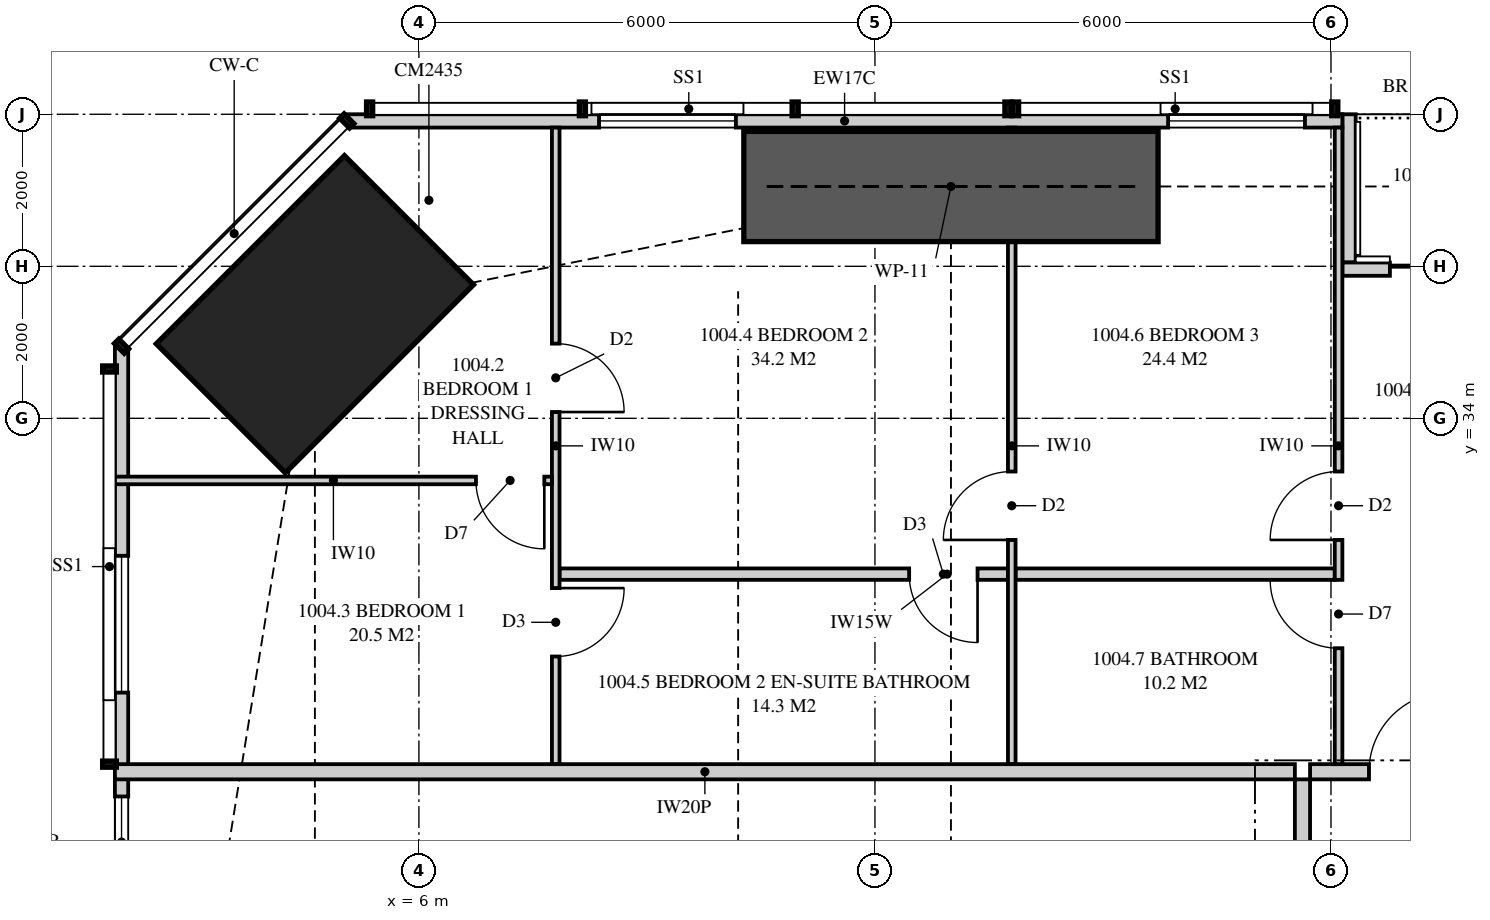
"""IFC4 building model, lengths in metres.
Left out: names, types, materials, properties, quantities, classifications, styles, units other than length and angle.
Written with IfcOpenShell. Run it as: python <this file> out.ifc"""

import sys

from ifc_helpers import new_model, si_unit, direction, frame, frame_2d, origin, origin_2d, place, context, subcontext, project, spatial, polyline, rectangle, outline, extrude, element, fill, save


model = new_model("IFC4")
c1 = context("Model", 3, precision=1e-05, world=origin(), true_north=direction((0.0, 1.0)))
c2 = subcontext(c1, "Body", "Model", "MODEL_VIEW")
j1 = project(units=[si_unit("LENGTHUNIT", "METRE"), si_unit("PLANEANGLEUNIT", "RADIAN")], contexts=[c1])
p1 = place(None, origin())
s1 = spatial("IfcSite", under=j1, at=p1, CompositionType="ELEMENT")
p2 = place(p1, origin())
s2 = spatial("IfcBuilding", under=s1, at=p2, CompositionType="ELEMENT")
p3 = place(p2, frame((0.0, 0.0, 41.1)))
s3 = spatial("IfcBuildingStorey", under=s2, at=p3, CompositionType="ELEMENT", Elevation=41.1)
p4 = place(p3, frame((4.631, 35.369, 0.0), z_axis=(0.0, 0.0, 1.0), x_axis=(0.707106781187, -0.707106781187, 0.0)))
e1 = element("IfcColumn", 1, at=p4, inside=s3, PredefinedType="COLUMN", context=c2, shape_type="SweptSolid", body=[
    extrude(rectangle(XDim=2.4, YDim=3.5, at=origin_2d()), origin(), (0.0, 0.0, 1.0), 3.35),
])
p5 = place(p3, frame((18.15, 37.913, 0.0), z_axis=(0.0, 0.0, 1.0), x_axis=(-1.0, 0.0, 0.0)))
e2 = element("IfcWall", 2, at=p5, inside=s3, PredefinedType="SOLIDWALL", context=c2, shape_type="SweptSolid", body=[
    extrude(outline(polyline([(0.0, 0.0), (13.099, 0.0), (13.099, 3.11), (5.354, 3.11), (5.354, 2.15), (5.306, 2.15), (5.306, 3.11), (5.15, 3.11), (5.15, 2.15), (0.0, 2.15), (0.0, 0.0)])), frame((0.0, 0.087, 0.0), z_axis=(0.0, -1.0, 0.0), x_axis=(1.0, 0.0, 0.0)), (0.0, 0.0, 1.0), 0.175),
])
p6 = place(p5, frame((0.492, 0.0, 0.4)))
e3 = element("IfcOpeningElement", 3, at=p6, cuts=e2, PredefinedType="OPENING", context=c2, shape_type="SweptSolid", body=[
    extrude(rectangle(XDim=1.8, YDim=1.7, at=frame_2d((0.9, 0.85))), frame((0.0, 0.097, 0.0), z_axis=(0.0, -1.0, 0.0), x_axis=(1.0, 0.0, 0.0)), (0.0, 0.0, 1.0), 0.195),
])
p7 = place(p5, frame((7.98, 0.0, 0.4)))
e4 = element("IfcOpeningElement", 4, at=p7, cuts=e2, PredefinedType="OPENING", context=c2, shape_type="SweptSolid", body=[
    extrude(rectangle(XDim=1.8, YDim=1.7, at=frame_2d((0.9, 0.85))), frame((0.0, 0.097, 0.0), z_axis=(0.0, -1.0, 0.0), x_axis=(1.0, 0.0, 0.0)), (0.0, 0.0, 1.0), 0.195),
])
p8 = place(p3, frame((21.2, 35.962, 0.0), z_axis=(0.0, 0.0, 1.0), x_axis=(-1.0, 0.0, 0.0)))
e5 = element("IfcWall", 5, at=p8, inside=s3, PredefinedType="SOLIDWALL", context=c2, shape_type="SweptSolid", body=[
    extrude(rectangle(XDim=3.05, YDim=0.175, at=frame_2d((1.525, 0.0))), origin(), (0.0, 0.0, 1.0), 3.11),
])
p9 = place(p8, frame((0.625, 0.0, 0.0)))
e6 = element("IfcOpeningElement", 6, at=p9, cuts=e5, PredefinedType="OPENING", context=c2, shape_type="SweptSolid", body=[
    extrude(rectangle(XDim=1.8, YDim=2.1, at=frame_2d((0.9, 1.05))), frame((0.0, 0.097, 0.0), z_axis=(0.0, -1.0, 0.0), x_axis=(1.0, 0.0, 0.0)), (0.0, 0.0, 1.0), 0.195),
])
p10 = place(p3, frame((18.238, 38.0, 0.0), z_axis=(0.0, 0.0, 1.0), x_axis=(0.0, -1.0, 0.0)))
e7 = element("IfcWall", 7, at=p10, inside=s3, PredefinedType="SOLIDWALL", context=c2, shape_type="SweptSolid", body=[
    extrude(outline(polyline([(0.0, 0.0), (1.95, 0.0), (1.95, 3.11), (1.75, 3.11), (1.75, 2.15), (0.15, 2.15), (0.15, 3.11), (0.0, 3.11), (0.0, 0.0)])), frame((0.0, 0.087, 0.0), z_axis=(0.0, -1.0, 0.0), x_axis=(1.0, 0.0, 0.0)), (0.0, 0.0, 1.0), 0.175),
])
p11 = place(p3, frame((2.087, 34.949, 0.0), z_axis=(0.0, 0.0, 1.0), x_axis=(0.0, -1.0, 0.0)))
e8 = element("IfcWall", 8, at=p11, inside=s3, PredefinedType="SOLIDWALL", context=c2, shape_type="SweptSolid", body=[
    extrude(outline(polyline([(0.0, 0.0), (16.099, 0.0), (16.099, 2.15), (9.949, 2.15), (9.949, 3.11), (9.823, 3.11), (9.823, 2.15), (9.73, 2.15), (9.73, 3.11), (0.0, 3.11), (0.0, 0.0)])), frame((0.0, 0.087, 0.0), z_axis=(0.0, -1.0, 0.0), x_axis=(1.0, 0.0, 0.0)), (0.0, 0.0, 1.0), 0.175),
])
p12 = place(p11, frame((2.757, 0.0, 0.4)))
e9 = element("IfcOpeningElement", 9, at=p12, cuts=e8, PredefinedType="OPENING", context=c2, shape_type="SweptSolid", body=[
    extrude(rectangle(XDim=1.8, YDim=1.7, at=frame_2d((0.9, 0.85))), frame((0.0, 0.097, 0.0), z_axis=(0.0, -1.0, 0.0), x_axis=(1.0, 0.0, 0.0)), (0.0, 0.0, 1.0), 0.195),
])
p13 = place(p11, frame((5.924, 0.0, 0.4)))
e10 = element("IfcOpeningElement", 10, at=p13, cuts=e8, PredefinedType="OPENING", context=c2, shape_type="SweptSolid", body=[
    extrude(rectangle(XDim=1.2, YDim=1.7, at=frame_2d((0.6, 0.85))), frame((0.0, 0.097, 0.0), z_axis=(0.0, -1.0, 0.0), x_axis=(1.0, 0.0, 0.0)), (0.0, 0.0, 1.0), 0.195),
])
p14 = place(p11, frame((12.799, 0.0, 0.4)))
e11 = element("IfcOpeningElement", 11, at=p14, cuts=e8, PredefinedType="OPENING", context=c2, shape_type="SweptSolid", body=[
    extrude(rectangle(XDim=1.8, YDim=1.7, at=frame_2d((0.9, 0.85))), frame((0.0, 0.097, 0.0), z_axis=(0.0, -1.0, 0.0), x_axis=(1.0, 0.0, 0.0)), (0.0, 0.0, 1.0), 0.195),
])
p15 = place(p3, frame((17.725, 29.35, 0.0), z_axis=(0.0, 0.0, 1.0), x_axis=(1.0, 0.0, 0.0)))
e12 = element("IfcWall", 12, at=p15, inside=s3, PredefinedType="PARTITIONING", context=c2, shape_type="SweptSolid", body=[
    extrude(rectangle(XDim=5.375, YDim=0.2, at=frame_2d((2.688, 0.0))), origin(), (0.0, 0.0, 1.0), 3.11),
])
p16 = place(p15, frame((0.775, 0.0, 0.0)))
e13 = element("IfcOpeningElement", 13, at=p16, cuts=e12, PredefinedType="OPENING", context=c2, shape_type="SweptSolid", body=[
    extrude(rectangle(XDim=1.05, YDim=2.2, at=frame_2d((0.525, 1.1))), frame((0.0, 0.11, 0.0), z_axis=(0.0, -1.0, 0.0), x_axis=(1.0, 0.0, 0.0)), (0.0, 0.0, 1.0), 0.22),
])
p17 = place(p3, frame((7.8, 37.825, 0.0), z_axis=(0.0, 0.0, 1.0), x_axis=(0.0, -1.0, 0.0)))
e14 = element("IfcWall", 14, at=p17, inside=s3, PredefinedType="PARTITIONING", context=c2, shape_type="SweptSolid", body=[
    extrude(outline(polyline([(0.0, 0.0), (8.375, 0.0), (8.375, 3.11), (2.697, 3.11), (2.697, 2.15), (0.943, 2.15), (0.943, 3.11), (0.0, 3.11), (0.0, 0.0)])), frame((0.0, 0.05, 0.0), z_axis=(0.0, -1.0, 0.0), x_axis=(1.0, 0.0, 0.0)), (0.0, 0.0, 1.0), 0.1),
])
p18 = place(p17, frame((2.842, 0.0, 0.0)))
e15 = element("IfcOpeningElement", 15, at=p18, cuts=e14, PredefinedType="OPENING", context=c2, shape_type="SweptSolid", body=[
    extrude(rectangle(XDim=0.9, YDim=2.1, at=frame_2d((0.45, 1.05))), frame((0.0, 0.06, 0.0), z_axis=(0.0, -1.0, 0.0), x_axis=(1.0, 0.0, 0.0)), (0.0, 0.0, 1.0), 0.12),
])
p19 = place(p17, frame((6.059, 0.0, 0.0)))
e16 = element("IfcOpeningElement", 16, at=p19, cuts=e14, PredefinedType="OPENING", context=c2, shape_type="SweptSolid", body=[
    extrude(rectangle(XDim=0.9, YDim=2.1, at=frame_2d((0.45, 1.05))), frame((0.0, 0.06, 0.0), z_axis=(0.0, -1.0, 0.0), x_axis=(1.0, 0.0, 0.0)), (0.0, 0.0, 1.0), 0.12),
])
p20 = place(p3, frame((13.8, 37.825, 0.0), z_axis=(0.0, 0.0, 1.0), x_axis=(0.0, -1.0, 0.0)))
e17 = element("IfcWall", 17, at=p20, inside=s3, PredefinedType="PARTITIONING", context=c2, shape_type="SweptSolid", body=[
    extrude(outline(polyline([(1.635, 2.15), (0.0, 2.15), (0.0, 0.0), (8.375, 0.0), (8.375, 3.11), (1.635, 3.11), (1.635, 2.15)]), holes=[polyline([(1.021, 0.126), (0.529, 0.126), (0.529, 0.919), (1.021, 0.919), (1.021, 0.126)]), polyline([(1.021, 1.231), (0.529, 1.231), (0.529, 2.024), (1.021, 2.024), (1.021, 1.231)])]), frame((0.0, 0.05, 0.0), z_axis=(0.0, -1.0, 0.0), x_axis=(1.0, 0.0, 0.0)), (0.0, 0.0, 1.0), 0.1),
])
p21 = place(p20, frame((4.525, 0.0, 0.0)))
e18 = element("IfcOpeningElement", 18, at=p21, cuts=e17, PredefinedType="OPENING", context=c2, shape_type="SweptSolid", body=[
    extrude(rectangle(XDim=0.9, YDim=2.1, at=frame_2d((0.45, 1.05))), frame((0.0, 0.06, 0.0), z_axis=(0.0, -1.0, 0.0), x_axis=(1.0, 0.0, 0.0)), (0.0, 0.0, 1.0), 0.12),
])
p22 = place(p3, frame((18.1, 37.825, 0.0), z_axis=(0.0, 0.0, 1.0), x_axis=(0.0, -1.0, 0.0)))
e19 = element("IfcWall", 19, at=p22, inside=s3, PredefinedType="PARTITIONING", context=c2, shape_type="SweptSolid", body=[
    extrude(outline(polyline([(0.0, 0.0), (8.375, 0.0), (8.375, 3.11), (1.635, 3.11), (1.635, 2.15), (0.0, 2.15), (0.0, 3.11), (0.0, 0.0)])), frame((0.0, 0.05, 0.0), z_axis=(0.0, -1.0, 0.0), x_axis=(1.0, 0.0, 0.0)), (0.0, 0.0, 1.0), 0.1),
])
p23 = place(p22, frame((4.525, 0.0, 0.0)))
e20 = element("IfcOpeningElement", 20, at=p23, cuts=e19, PredefinedType="OPENING", context=c2, shape_type="SweptSolid", body=[
    extrude(rectangle(XDim=0.9, YDim=2.1, at=frame_2d((0.45, 1.05))), frame((0.0, 0.06, 0.0), z_axis=(0.0, -1.0, 0.0), x_axis=(1.0, 0.0, 0.0)), (0.0, 0.0, 1.0), 0.12),
])
p24 = place(p22, frame((5.95, 0.0, 0.0)))
e21 = element("IfcOpeningElement", 21, at=p24, cuts=e19, PredefinedType="OPENING", context=c2, shape_type="SweptSolid", body=[
    extrude(rectangle(XDim=0.9, YDim=2.1, at=frame_2d((0.45, 1.05))), frame((0.0, 0.06, 0.0), z_axis=(0.0, -1.0, 0.0), x_axis=(1.0, 0.0, 0.0)), (0.0, 0.0, 1.0), 0.12),
])
p25 = place(p3, frame((2.0, 33.183, 0.0), z_axis=(0.0, 0.0, 1.0), x_axis=(1.0, 0.0, 0.0)))
e22 = element("IfcWall", 22, at=p25, inside=s3, PredefinedType="PARTITIONING", context=c2, shape_type="SweptSolid", body=[
    extrude(outline(polyline([(0.0, 0.0), (5.75, 0.0), (5.75, 3.11), (3.148, 3.11), (3.148, 2.15), (1.406, 2.15), (1.406, 3.11), (0.0, 3.11), (0.0, 0.0)])), frame((0.0, 0.05, 0.0), z_axis=(0.0, -1.0, 0.0), x_axis=(1.0, 0.0, 0.0)), (0.0, 0.0, 1.0), 0.1),
])
p26 = place(p25, frame((4.75, 0.0, 0.0)))
e23 = element("IfcOpeningElement", 23, at=p26, cuts=e22, PredefinedType="OPENING", context=c2, shape_type="SweptSolid", body=[
    extrude(rectangle(XDim=0.9, YDim=2.1, at=frame_2d((0.45, 1.05))), frame((0.0, 0.06, 0.0), z_axis=(0.0, -1.0, 0.0), x_axis=(1.0, 0.0, 0.0)), (0.0, 0.0, 1.0), 0.12),
])
p27 = place(p3, frame((7.85, 31.95, 0.0), z_axis=(0.0, 0.0, 1.0), x_axis=(1.0, 0.0, 0.0)))
e24 = element("IfcWall", 24, at=p27, inside=s3, PredefinedType="PLUMBINGWALL", context=c2, shape_type="SweptSolid", body=[
    extrude(outline(polyline([(0.0, 0.0), (5.9, 0.0), (5.9, 3.11), (5.462, 3.11), (5.462, 2.541), (4.838, 2.541), (4.838, 3.11), (3.635, 3.11), (3.635, 2.51), (1.065, 2.51), (1.065, 3.11), (0.0, 3.11), (0.0, 0.0)])), frame((0.0, 0.075, 0.0), z_axis=(0.0, -1.0, 0.0), x_axis=(1.0, 0.0, 0.0)), (0.0, 0.0, 1.0), 0.15),
])
p28 = place(p27, frame((4.6, 0.0, 0.0)))
e25 = element("IfcOpeningElement", 25, at=p28, cuts=e24, PredefinedType="OPENING", context=c2, shape_type="SweptSolid", body=[
    extrude(rectangle(XDim=0.9, YDim=2.1, at=frame_2d((0.45, 1.05))), frame((0.0, 0.085, 0.0), z_axis=(0.0, -1.0, 0.0), x_axis=(1.0, 0.0, 0.0)), (0.0, 0.0, 1.0), 0.17),
])
p29 = place(p3, frame((13.85, 31.95, 0.0), z_axis=(0.0, 0.0, 1.0), x_axis=(1.0, 0.0, 0.0)))
e26 = element("IfcWall", 26, at=p29, inside=s3, PredefinedType="PLUMBINGWALL", context=c2, shape_type="SweptSolid", body=[
    extrude(rectangle(XDim=4.2, YDim=0.15, at=frame_2d((2.1, 0.0))), origin(), (0.0, 0.0, 1.0), 3.11),
])
p30 = place(p3, frame((2.0, 29.35, 0.0), z_axis=(0.0, 0.0, 1.0), x_axis=(1.0, 0.0, 0.0)))
e27 = element("IfcWall", 27, at=p30, inside=s3, PredefinedType="PARTITIONING", context=c2, shape_type="SweptSolid", body=[
    extrude(outline(polyline([(0.0, 0.0), (15.525, 0.0), (15.525, 3.11), (11.337, 3.11), (11.337, 2.541), (10.663, 2.541), (10.663, 3.11), (9.51, 3.11), (9.51, 2.51), (6.89, 2.51), (6.89, 3.11), (2.969, 3.11), (2.969, 2.541), (2.577, 2.541), (2.577, 2.15), (0.733, 2.15), (0.733, 3.11), (0.0, 3.11), (0.0, 0.0)])), frame((0.0, 0.1, 0.0), z_axis=(0.0, -1.0, 0.0), x_axis=(1.0, 0.0, 0.0)), (0.0, 0.0, 1.0), 0.2),
])
p31 = place(p3, frame((17.625, 24.1, 0.0), z_axis=(0.0, 0.0, 1.0), x_axis=(0.0, 1.0, 0.0)))
e28 = element("IfcWall", 28, at=p31, inside=s3, PredefinedType="PARTITIONING", context=c2, shape_type="SweptSolid", body=[
    extrude(outline(polyline([(0.0, 0.0), (5.15, 0.0), (5.15, 3.11), (1.237, 3.11), (1.237, 2.541), (0.562, 2.541), (0.562, 3.11), (0.0, 3.11), (0.0, 0.0)])), frame((0.0, 0.1, 0.0), z_axis=(0.0, -1.0, 0.0), x_axis=(1.0, 0.0, 0.0)), (0.0, 0.0, 1.0), 0.2),
])
p32 = place(p31, frame((1.675, 0.0, 0.0)))
e29 = element("IfcOpeningElement", 29, at=p32, cuts=e28, PredefinedType="OPENING", context=c2, shape_type="SweptSolid", body=[
    extrude(rectangle(XDim=1.8, YDim=2.1, at=frame_2d((0.9, 1.05))), frame((0.0, 0.11, 0.0), z_axis=(0.0, -1.0, 0.0), x_axis=(1.0, 0.0, 0.0)), (0.0, 0.0, 1.0), 0.22),
])
p33 = place(p3, frame((10.275, 37.05, 0.0), z_axis=(0.0, 0.0, 1.0), x_axis=(1.0, 0.0, 0.0)))
e30 = element("IfcWall", 30, at=p33, inside=s3, PredefinedType="SHEAR", context=c2, shape_type="SweptSolid", body=[
    extrude(rectangle(XDim=5.45, YDim=1.45, at=frame_2d((2.725, 0.0))), origin(), (0.0, 0.0, 1.0), 3.35),
])
p34 = place(p9, origin())
e31 = element("IfcDoor", 31, at=p34, inside=s3, OperationType="SLIDING_TO_LEFT", PredefinedType="DOOR", context=c2, shape_type="SweptSolid", body=[
    extrude(rectangle(XDim=1.8, YDim=2.1, at=frame_2d((0.9, 1.05))), frame((0.0, 0.025, 0.0), z_axis=(0.0, -1.0, 0.0), x_axis=(1.0, 0.0, 0.0)), (0.0, 0.0, 1.0), 0.05),
])
fill(e6, e31)
p35 = place(p6, origin())
e32 = element("IfcWindow", 32, at=p35, inside=s3, PartitioningType="SINGLE_PANEL", PredefinedType="WINDOW", context=c2, shape_type="SweptSolid", body=[
    extrude(rectangle(XDim=1.8, YDim=1.7, at=frame_2d((0.9, 0.85))), frame((0.0, 0.03, 0.0), z_axis=(0.0, -1.0, 0.0), x_axis=(1.0, 0.0, 0.0)), (0.0, 0.0, 1.0), 0.06),
])
fill(e3, e32)
p36 = place(p7, origin())
e33 = element("IfcWindow", 33, at=p36, inside=s3, PartitioningType="SINGLE_PANEL", PredefinedType="WINDOW", context=c2, shape_type="SweptSolid", body=[
    extrude(rectangle(XDim=1.8, YDim=1.7, at=frame_2d((0.9, 0.85))), frame((0.0, 0.03, 0.0), z_axis=(0.0, -1.0, 0.0), x_axis=(1.0, 0.0, 0.0)), (0.0, 0.0, 1.0), 0.06),
])
fill(e4, e33)
p37 = place(p12, origin())
e34 = element("IfcWindow", 34, at=p37, inside=s3, PartitioningType="SINGLE_PANEL", PredefinedType="WINDOW", context=c2, shape_type="SweptSolid", body=[
    extrude(rectangle(XDim=1.8, YDim=1.7, at=frame_2d((0.9, 0.85))), frame((0.0, 0.03, 0.0), z_axis=(0.0, -1.0, 0.0), x_axis=(1.0, 0.0, 0.0)), (0.0, 0.0, 1.0), 0.06),
])
fill(e9, e34)
p38 = place(p13, origin())
e35 = element("IfcWindow", 35, at=p38, inside=s3, PartitioningType="SINGLE_PANEL", PredefinedType="WINDOW", context=c2, shape_type="SweptSolid", body=[
    extrude(rectangle(XDim=1.2, YDim=1.7, at=frame_2d((0.6, 0.85))), frame((0.0, 0.03, 0.0), z_axis=(0.0, -1.0, 0.0), x_axis=(1.0, 0.0, 0.0)), (0.0, 0.0, 1.0), 0.06),
])
fill(e10, e35)
p39 = place(p16, origin())
e36 = element("IfcDoor", 36, at=p39, inside=s3, OperationType="SINGLE_SWING_RIGHT", PredefinedType="DOOR", context=c2, shape_type="SweptSolid", body=[
    extrude(rectangle(XDim=1.05, YDim=2.2, at=frame_2d((0.525, 1.1))), frame((0.0, 0.025, 0.0), z_axis=(0.0, -1.0, 0.0), x_axis=(1.0, 0.0, 0.0)), (0.0, 0.0, 1.0), 0.05),
])
fill(e13, e36)
p40 = place(p26, frame((0.9, 0.0, 0.0), z_axis=(0.0, 0.0, 1.0), x_axis=(-1.0, 0.0, 0.0)))
e37 = element("IfcDoor", 37, at=p40, inside=s3, OperationType="SINGLE_SWING_LEFT", PredefinedType="DOOR", context=c2, shape_type="SweptSolid", body=[
    extrude(rectangle(XDim=0.9, YDim=2.1, at=frame_2d((0.45, 1.05))), frame((0.0, 0.025, 0.0), z_axis=(0.0, -1.0, 0.0), x_axis=(1.0, 0.0, 0.0)), (0.0, 0.0, 1.0), 0.05),
])
fill(e23, e37)
p41 = place(p18, origin())
e38 = element("IfcDoor", 38, at=p41, inside=s3, OperationType="SINGLE_SWING_RIGHT", PredefinedType="DOOR", context=c2, shape_type="SweptSolid", body=[
    extrude(rectangle(XDim=0.9, YDim=2.1, at=frame_2d((0.45, 1.05))), frame((0.0, 0.025, 0.0), z_axis=(0.0, -1.0, 0.0), x_axis=(1.0, 0.0, 0.0)), (0.0, 0.0, 1.0), 0.05),
])
fill(e15, e38)
p42 = place(p21, frame((0.9, 0.0, 0.0), z_axis=(0.0, 0.0, 1.0), x_axis=(-1.0, 0.0, 0.0)))
e39 = element("IfcDoor", 39, at=p42, inside=s3, OperationType="SINGLE_SWING_LEFT", PredefinedType="DOOR", context=c2, shape_type="SweptSolid", body=[
    extrude(rectangle(XDim=0.9, YDim=2.1, at=frame_2d((0.45, 1.05))), frame((0.0, 0.025, 0.0), z_axis=(0.0, -1.0, 0.0), x_axis=(1.0, 0.0, 0.0)), (0.0, 0.0, 1.0), 0.05),
])
fill(e18, e39)
p43 = place(p28, frame((0.9, 0.0, 0.0), z_axis=(0.0, 0.0, 1.0), x_axis=(-1.0, 0.0, 0.0)))
e40 = element("IfcDoor", 40, at=p43, inside=s3, OperationType="SINGLE_SWING_LEFT", PredefinedType="DOOR", context=c2, shape_type="SweptSolid", body=[
    extrude(rectangle(XDim=0.9, YDim=2.1, at=frame_2d((0.45, 1.05))), frame((0.0, 0.025, 0.0), z_axis=(0.0, -1.0, 0.0), x_axis=(1.0, 0.0, 0.0)), (0.0, 0.0, 1.0), 0.05),
])
fill(e25, e40)
p44 = place(p23, frame((0.9, 0.0, 0.0), z_axis=(0.0, 0.0, 1.0), x_axis=(-1.0, 0.0, 0.0)))
e41 = element("IfcDoor", 41, at=p44, inside=s3, OperationType="SINGLE_SWING_LEFT", PredefinedType="DOOR", context=c2, shape_type="SweptSolid", body=[
    extrude(rectangle(XDim=0.9, YDim=2.1, at=frame_2d((0.45, 1.05))), frame((0.0, 0.025, 0.0), z_axis=(0.0, -1.0, 0.0), x_axis=(1.0, 0.0, 0.0)), (0.0, 0.0, 1.0), 0.05),
])
fill(e20, e41)
p45 = place(p24, frame((0.9, 0.0, 0.0), z_axis=(0.0, 0.0, 1.0), x_axis=(-1.0, 0.0, 0.0)))
e42 = element("IfcDoor", 42, at=p45, inside=s3, OperationType="SINGLE_SWING_RIGHT", PredefinedType="DOOR", context=c2, shape_type="SweptSolid", body=[
    extrude(rectangle(XDim=0.9, YDim=2.1, at=frame_2d((0.45, 1.05))), frame((0.0, 0.025, 0.0), z_axis=(0.0, -1.0, 0.0), x_axis=(1.0, 0.0, 0.0)), (0.0, 0.0, 1.0), 0.05),
])
fill(e21, e42)
p46 = place(p19, origin())
e43 = element("IfcDoor", 43, at=p46, inside=s3, OperationType="SINGLE_SWING_LEFT", PredefinedType="DOOR", context=c2, shape_type="SweptSolid", body=[
    extrude(rectangle(XDim=0.9, YDim=2.1, at=frame_2d((0.45, 1.05))), frame((0.0, 0.025, 0.0), z_axis=(0.0, -1.0, 0.0), x_axis=(1.0, 0.0, 0.0)), (0.0, 0.0, 1.0), 0.05),
])
fill(e16, e43)
save(model, sys.argv[1])
